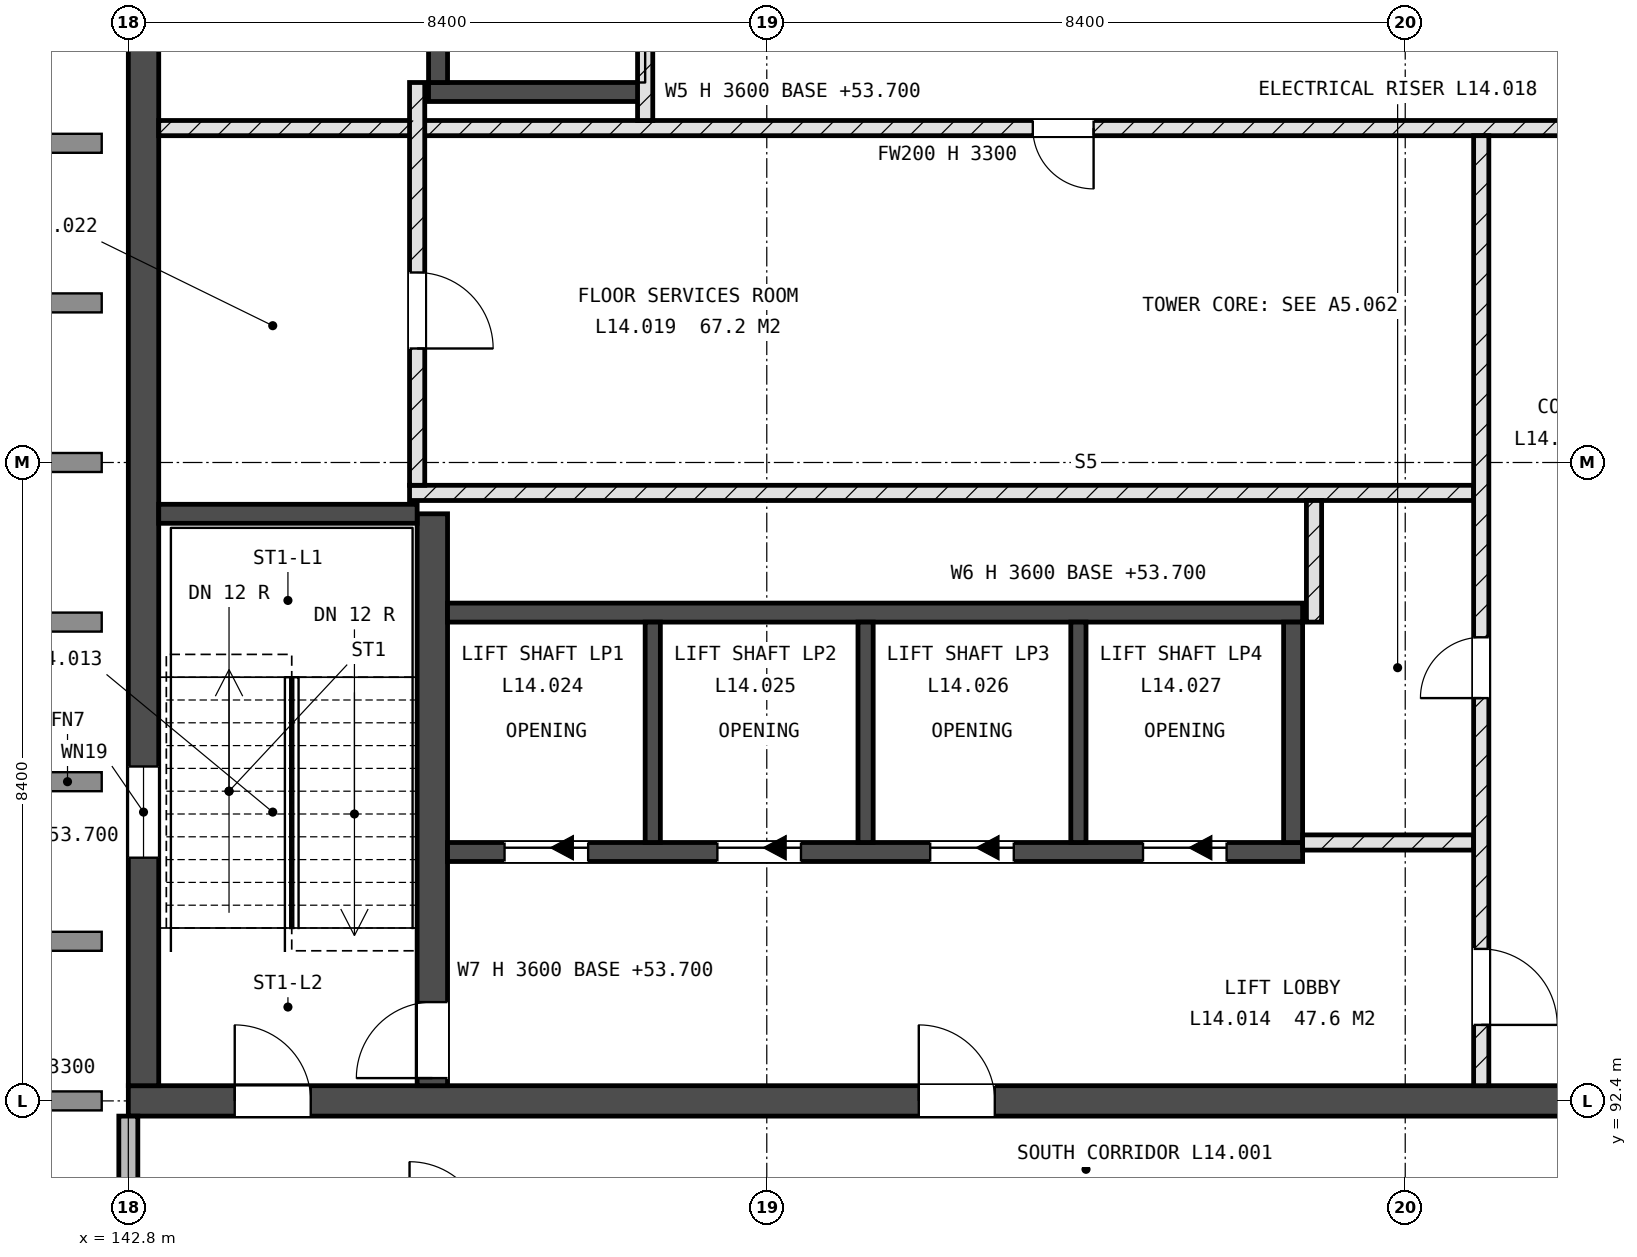
"""IFC4 building model, lengths in metres.
Left out: names, types, materials, properties, quantities, classifications, styles, units other than length and angle.
Written with IfcOpenShell. Run it as: python <this file> out.ifc"""

import sys

from ifc_helpers import new_model, si_unit, direction, frame, frame_2d, origin, place, context, subcontext, project, spatial, rectangle, extrude, element, fill, save


model = new_model("IFC4")
c1 = context("Model", 3, precision=1e-05, world=origin(), true_north=direction((0.0, 1.0)))
c2 = subcontext(c1, "Body", "Model", "MODEL_VIEW")
j1 = project(units=[si_unit("LENGTHUNIT", "METRE"), si_unit("PLANEANGLEUNIT", "RADIAN")], contexts=[c1])
p1 = place(None, origin())
s1 = spatial("IfcSite", under=j1, at=p1, CompositionType="ELEMENT")
p2 = place(p1, origin())
s2 = spatial("IfcBuilding", under=s1, at=p2, CompositionType="ELEMENT")
p3 = place(p2, frame((0.0, 0.0, 54.0)))
s3 = spatial("IfcBuildingStorey", under=s2, at=p3, CompositionType="ELEMENT", Elevation=54.0)
p4 = place(p3, frame((142.8, 92.4, -0.3), z_axis=(0.0, 0.0, 1.0), x_axis=(1.0, 0.0, 0.0)))
e1 = element("IfcWall", 1, at=p4, inside=s3, PredefinedType="SHEAR", context=c2, shape_type="SweptSolid", body=[
    extrude(rectangle(XDim=25.2, YDim=0.4, at=frame_2d((12.6, 0.0))), origin(), (0.0, 0.0, 1.0), 3.6),
])
p5 = place(p4, frame((1.4, 0.0, 0.3)))
e2 = element("IfcOpeningElement", 2, at=p5, cuts=e1, PredefinedType="OPENING", context=c2, shape_type="SweptSolid", body=[
    extrude(rectangle(XDim=1.0, YDim=2.1, at=frame_2d((0.5, 1.05))), frame((0.0, 0.21, 0.0), z_axis=(0.0, -1.0, 0.0), x_axis=(1.0, 0.0, 0.0)), (0.0, 0.0, 1.0), 0.42),
])
p6 = place(p4, frame((19.1, 0.0, 0.3)))
e3 = element("IfcOpeningElement", 3, at=p6, cuts=e1, PredefinedType="OPENING", context=c2, shape_type="SweptSolid", body=[
    extrude(rectangle(XDim=1.0, YDim=2.1, at=frame_2d((0.5, 1.05))), frame((0.0, 0.21, 0.0), z_axis=(0.0, -1.0, 0.0), x_axis=(1.0, 0.0, 0.0)), (0.0, 0.0, 1.0), 0.42),
])
p7 = place(p4, frame((10.4, 0.0, 0.3)))
e4 = element("IfcOpeningElement", 4, at=p7, cuts=e1, PredefinedType="OPENING", context=c2, shape_type="SweptSolid", body=[
    extrude(rectangle(XDim=1.0, YDim=2.1, at=frame_2d((0.5, 1.05))), frame((0.0, 0.21, 0.0), z_axis=(0.0, -1.0, 0.0), x_axis=(1.0, 0.0, 0.0)), (0.0, 0.0, 1.0), 0.42),
])
p8 = place(p3, frame((143.0, 92.6, -0.3), z_axis=(0.0, 0.0, 1.0), x_axis=(0.0, 1.0, 0.0)))
e5 = element("IfcWall", 5, at=p8, inside=s3, PredefinedType="SHEAR", context=c2, shape_type="SweptSolid", body=[
    extrude(rectangle(XDim=16.4, YDim=0.4, at=frame_2d((8.2, 0.0))), origin(), (0.0, 0.0, 1.0), 3.6),
])
p9 = place(p8, frame((3.0, 0.0, 1.9)))
e6 = element("IfcOpeningElement", 6, at=p9, cuts=e5, PredefinedType="OPENING", context=c2, shape_type="SweptSolid", body=[
    extrude(rectangle(XDim=1.2, YDim=0.9, at=frame_2d((0.6, 0.45))), frame((0.0, 0.21, 0.0), z_axis=(0.0, -1.0, 0.0), x_axis=(1.0, 0.0, 0.0)), (0.0, 0.0, 1.0), 0.42),
])
p10 = place(p3, frame((146.8, 92.6, -0.3), z_axis=(0.0, 0.0, 1.0), x_axis=(0.0, 1.0, 0.0)))
e7 = element("IfcWall", 7, at=p10, inside=s3, PredefinedType="SHEAR", context=c2, shape_type="SweptSolid", body=[
    extrude(rectangle(XDim=7.525, YDim=0.4, at=frame_2d((3.762, 0.0))), origin(), (0.0, 0.0, 1.0), 3.6),
])
p11 = place(p10, frame((0.1, 0.0, 0.3)))
e8 = element("IfcOpeningElement", 8, at=p11, cuts=e7, PredefinedType="OPENING", context=c2, shape_type="SweptSolid", body=[
    extrude(rectangle(XDim=1.0, YDim=2.1, at=frame_2d((0.5, 1.05))), frame((0.0, 0.21, 0.0), z_axis=(0.0, -1.0, 0.0), x_axis=(1.0, 0.0, 0.0)), (0.0, 0.0, 1.0), 0.42),
])
p12 = place(p3, frame((143.2, 100.125, -0.3), z_axis=(0.0, 0.0, 1.0), x_axis=(1.0, 0.0, 0.0)))
e9 = element("IfcWall", 9, at=p12, inside=s3, PredefinedType="SHEAR", context=c2, shape_type="SweptSolid", body=[
    extrude(rectangle(XDim=3.4, YDim=0.25, at=frame_2d((1.7, 0.0))), origin(), (0.0, 0.0, 1.0), 3.6),
])
p13 = place(p3, frame((147.0, 95.675, -0.3), z_axis=(0.0, 0.0, 1.0), x_axis=(1.0, 0.0, 0.0)))
e10 = element("IfcWall", 10, at=p13, inside=s3, PredefinedType="SHEAR", context=c2, shape_type="SweptSolid", body=[
    extrude(rectangle(XDim=11.25, YDim=0.25, at=frame_2d((5.625, 0.0))), origin(), (0.0, 0.0, 1.0), 3.6),
])
p14 = place(p13, frame((0.75, 0.0, 0.3)))
e11 = element("IfcOpeningElement", 11, at=p14, cuts=e10, PredefinedType="OPENING", context=c2, shape_type="SweptSolid", body=[
    extrude(rectangle(XDim=1.1, YDim=2.1, at=frame_2d((0.55, 1.05))), frame((0.0, 0.135, 0.0), z_axis=(0.0, -1.0, 0.0), x_axis=(1.0, 0.0, 0.0)), (0.0, 0.0, 1.0), 0.27),
])
p15 = place(p13, frame((3.55, 0.0, 0.3)))
e12 = element("IfcOpeningElement", 12, at=p15, cuts=e10, PredefinedType="OPENING", context=c2, shape_type="SweptSolid", body=[
    extrude(rectangle(XDim=1.1, YDim=2.1, at=frame_2d((0.55, 1.05))), frame((0.0, 0.135, 0.0), z_axis=(0.0, -1.0, 0.0), x_axis=(1.0, 0.0, 0.0)), (0.0, 0.0, 1.0), 0.27),
])
p16 = place(p13, frame((6.35, 0.0, 0.3)))
e13 = element("IfcOpeningElement", 13, at=p16, cuts=e10, PredefinedType="OPENING", context=c2, shape_type="SweptSolid", body=[
    extrude(rectangle(XDim=1.1, YDim=2.1, at=frame_2d((0.55, 1.05))), frame((0.0, 0.135, 0.0), z_axis=(0.0, -1.0, 0.0), x_axis=(1.0, 0.0, 0.0)), (0.0, 0.0, 1.0), 0.27),
])
p17 = place(p13, frame((9.15, 0.0, 0.3)))
e14 = element("IfcOpeningElement", 14, at=p17, cuts=e10, PredefinedType="OPENING", context=c2, shape_type="SweptSolid", body=[
    extrude(rectangle(XDim=1.1, YDim=2.1, at=frame_2d((0.55, 1.05))), frame((0.0, 0.135, 0.0), z_axis=(0.0, -1.0, 0.0), x_axis=(1.0, 0.0, 0.0)), (0.0, 0.0, 1.0), 0.27),
])
p18 = place(p3, frame((147.0, 98.825, -0.3), z_axis=(0.0, 0.0, 1.0), x_axis=(1.0, 0.0, 0.0)))
e15 = element("IfcWall", 15, at=p18, inside=s3, PredefinedType="SHEAR", context=c2, shape_type="SweptSolid", body=[
    extrude(rectangle(XDim=11.25, YDim=0.25, at=frame_2d((5.625, 0.0))), origin(), (0.0, 0.0, 1.0), 3.6),
])
p19 = place(p3, frame((158.125, 95.8, -0.3), z_axis=(0.0, 0.0, 1.0), x_axis=(0.0, 1.0, 0.0)))
e16 = element("IfcWall", 16, at=p19, inside=s3, PredefinedType="SHEAR", context=c2, shape_type="SweptSolid", body=[
    extrude(rectangle(XDim=2.9, YDim=0.25, at=frame_2d((1.45, 0.0))), origin(), (0.0, 0.0, 1.0), 3.6),
])
for number, where, z_axis, x_axis in (
    (17, (149.7, 95.8, -0.3), (0.0, 0.0, 1.0), (0.0, 1.0, 0.0)),
    (18, (152.5, 95.8, -0.3), (0.0, 0.0, 1.0), (0.0, 1.0, 0.0)),
    (19, (155.3, 95.8, -0.3), (0.0, 0.0, 1.0), (0.0, 1.0, 0.0)),
):
    element("IfcWall", number, at=place(p3, frame(where, z_axis=z_axis, x_axis=x_axis)), inside=s3, PredefinedType="SHEAR", context=c2, shape_type="SweptSolid", body=[
        extrude(rectangle(XDim=2.9, YDim=0.2, at=frame_2d((1.45, 0.0))), origin(), (0.0, 0.0, 1.0), 3.6),
    ])
p20 = place(p3, frame((146.75, 105.675, -0.3), z_axis=(0.0, 0.0, 1.0), x_axis=(1.0, 0.0, 0.0)))
e20 = element("IfcWall", 20, at=p20, inside=s3, PredefinedType="SHEAR", context=c2, shape_type="SweptSolid", body=[
    extrude(rectangle(XDim=2.85, YDim=0.25, at=frame_2d((1.425, 0.0))), origin(), (0.0, 0.0, 1.0), 3.6),
])
p21 = place(p3, frame((146.875, 105.8, -0.3), z_axis=(0.0, 0.0, 1.0), x_axis=(0.0, 1.0, 0.0)))
e21 = element("IfcWall", 21, at=p21, inside=s3, PredefinedType="SHEAR", context=c2, shape_type="SweptSolid", body=[
    extrude(rectangle(XDim=2.9, YDim=0.25, at=frame_2d((1.45, 0.0))), origin(), (0.0, 0.0, 1.0), 3.6),
])
p22 = place(p3, frame((142.8, 84.35, 0.0), z_axis=(0.0, 0.0, 1.0), x_axis=(0.0, 1.0, 0.0)))
e22 = element("IfcWall", 22, at=p22, inside=s3, PredefinedType="STANDARD", context=c2, shape_type="SweptSolid", body=[
    extrude(rectangle(XDim=7.85, YDim=0.25, at=frame_2d((3.925, 0.0))), origin(), (0.0, 0.0, 1.0), 3.3),
])
p23 = place(p22, frame((2.35, 0.0, 2.1)))
e23 = element("IfcOpeningElement", 23, at=p23, cuts=e22, PredefinedType="OPENING", context=c2, shape_type="SweptSolid", body=[
    extrude(rectangle(XDim=0.9, YDim=0.6, at=frame_2d((0.45, 0.3))), frame((0.0, 0.135, 0.0), z_axis=(0.0, -1.0, 0.0), x_axis=(1.0, 0.0, 0.0)), (0.0, 0.0, 1.0), 0.27),
])
p24 = place(p3, frame((158.25, 95.8, 0.0), z_axis=(0.0, 0.0, 1.0), x_axis=(1.0, 0.0, 0.0)))
e24 = element("IfcWall", 24, at=p24, inside=s3, PredefinedType="SOLIDWALL", context=c2, shape_type="SweptSolid", body=[
    extrude(rectangle(XDim=2.25, YDim=0.2, at=frame_2d((1.125, 0.0))), origin(), (0.0, 0.0, 1.0), 3.3),
])
p25 = place(p3, frame((146.5, 100.4, 0.0), z_axis=(0.0, 0.0, 1.0), x_axis=(1.0, 0.0, 0.0)))
e25 = element("IfcWall", 25, at=p25, inside=s3, PredefinedType="SOLIDWALL", context=c2, shape_type="SweptSolid", body=[
    extrude(rectangle(XDim=14.0, YDim=0.2, at=frame_2d((7.0, 0.0))), origin(), (0.0, 0.0, 1.0), 3.3),
])
p26 = place(p3, frame((143.2, 105.2, 0.0), z_axis=(0.0, 0.0, 1.0), x_axis=(1.0, 0.0, 0.0)))
e26 = element("IfcWall", 26, at=p26, inside=s3, PredefinedType="SOLIDWALL", context=c2, shape_type="SweptSolid", body=[
    extrude(rectangle(XDim=20.75, YDim=0.2, at=frame_2d((10.375, 0.0))), origin(), (0.0, 0.0, 1.0), 3.3),
])
p27 = place(p26, frame((11.5, 0.0, 0.0)))
e27 = element("IfcOpeningElement", 27, at=p27, cuts=e26, PredefinedType="OPENING", context=c2, shape_type="SweptSolid", body=[
    extrude(rectangle(XDim=0.8, YDim=2.1, at=frame_2d((0.4, 1.05))), frame((0.0, 0.11, 0.0), z_axis=(0.0, -1.0, 0.0), x_axis=(1.0, 0.0, 0.0)), (0.0, 0.0, 1.0), 0.22),
])
p28 = place(p26, frame((18.8, 0.0, 0.0)))
e28 = element("IfcOpeningElement", 28, at=p28, cuts=e26, PredefinedType="OPENING", context=c2, shape_type="SweptSolid", body=[
    extrude(rectangle(XDim=1.0, YDim=2.1, at=frame_2d((0.5, 1.05))), frame((0.0, 0.11, 0.0), z_axis=(0.0, -1.0, 0.0), x_axis=(1.0, 0.0, 0.0)), (0.0, 0.0, 1.0), 0.22),
])
p29 = place(p3, frame((146.6, 100.5, 0.0), z_axis=(0.0, 0.0, 1.0), x_axis=(0.0, 1.0, 0.0)))
e29 = element("IfcWall", 29, at=p29, inside=s3, PredefinedType="SOLIDWALL", context=c2, shape_type="SweptSolid", body=[
    extrude(rectangle(XDim=5.3, YDim=0.2, at=frame_2d((2.65, 0.0))), origin(), (0.0, 0.0, 1.0), 3.3),
])
p30 = place(p29, frame((1.8, 0.0, 0.0)))
e30 = element("IfcOpeningElement", 30, at=p30, cuts=e29, PredefinedType="OPENING", context=c2, shape_type="SweptSolid", body=[
    extrude(rectangle(XDim=1.0, YDim=2.1, at=frame_2d((0.5, 1.05))), frame((0.0, 0.11, 0.0), z_axis=(0.0, -1.0, 0.0), x_axis=(1.0, 0.0, 0.0)), (0.0, 0.0, 1.0), 0.22),
])
p31 = place(p3, frame((149.6, 105.3, 0.0), z_axis=(0.0, 0.0, 1.0), x_axis=(0.0, 1.0, 0.0)))
e31 = element("IfcWall", 31, at=p31, inside=s3, PredefinedType="SOLIDWALL", context=c2, shape_type="SweptSolid", body=[
    extrude(rectangle(XDim=3.7, YDim=0.2, at=frame_2d((1.85, 0.0))), origin(), (0.0, 0.0, 1.0), 3.3),
])
p32 = place(p31, frame((1.4, 0.0, 0.0)))
e32 = element("IfcOpeningElement", 32, at=p32, cuts=e31, PredefinedType="OPENING", context=c2, shape_type="SweptSolid", body=[
    extrude(rectangle(XDim=1.1, YDim=2.1, at=frame_2d((0.55, 1.05))), frame((0.0, 0.11, 0.0), z_axis=(0.0, -1.0, 0.0), x_axis=(1.0, 0.0, 0.0)), (0.0, 0.0, 1.0), 0.22),
])
p33 = place(p3, frame((158.4, 98.7, 0.0), z_axis=(0.0, 0.0, 1.0), x_axis=(0.0, 1.0, 0.0)))
e33 = element("IfcWall", 33, at=p33, inside=s3, PredefinedType="SOLIDWALL", context=c2, shape_type="SweptSolid", body=[
    extrude(rectangle(XDim=1.6, YDim=0.2, at=frame_2d((0.8, 0.0))), origin(), (0.0, 0.0, 1.0), 3.3),
])
p34 = place(p3, frame((160.6, 92.6, 0.0), z_axis=(0.0, 0.0, 1.0), x_axis=(0.0, 1.0, 0.0)))
e34 = element("IfcWall", 34, at=p34, inside=s3, PredefinedType="SOLIDWALL", context=c2, shape_type="SweptSolid", body=[
    extrude(rectangle(XDim=12.5, YDim=0.2, at=frame_2d((6.25, 0.0))), origin(), (0.0, 0.0, 1.0), 3.3),
])
p35 = place(p34, frame((5.1, 0.0, 0.0)))
e35 = element("IfcOpeningElement", 35, at=p35, cuts=e34, PredefinedType="OPENING", context=c2, shape_type="SweptSolid", body=[
    extrude(rectangle(XDim=0.8, YDim=2.1, at=frame_2d((0.4, 1.05))), frame((0.0, 0.11, 0.0), z_axis=(0.0, -1.0, 0.0), x_axis=(1.0, 0.0, 0.0)), (0.0, 0.0, 1.0), 0.22),
])
p36 = place(p34, frame((0.8, 0.0, 0.0)))
e36 = element("IfcOpeningElement", 36, at=p36, cuts=e34, PredefinedType="OPENING", context=c2, shape_type="SweptSolid", body=[
    extrude(rectangle(XDim=1.0, YDim=2.1, at=frame_2d((0.5, 1.05))), frame((0.0, 0.11, 0.0), z_axis=(0.0, -1.0, 0.0), x_axis=(1.0, 0.0, 0.0)), (0.0, 0.0, 1.0), 0.22),
])
p37 = place(p9, origin())
e37 = element("IfcWindow", 37, at=p37, inside=s3, PartitioningType="SINGLE_PANEL", PredefinedType="WINDOW", context=c2, shape_type="SweptSolid", body=[
    extrude(rectangle(XDim=1.2, YDim=0.9, at=frame_2d((0.6, 0.45))), frame((0.0, 0.03, 0.0), z_axis=(0.0, -1.0, 0.0), x_axis=(1.0, 0.0, 0.0)), (0.0, 0.0, 1.0), 0.06),
])
fill(e6, e37)
p38 = place(p14, origin())
e38 = element("IfcDoor", 38, at=p38, inside=s3, OperationType="SLIDING_TO_LEFT", PredefinedType="DOOR", context=c2, shape_type="SweptSolid", body=[
    extrude(rectangle(XDim=1.1, YDim=2.1, at=frame_2d((0.55, 1.05))), frame((0.0, 0.025, 0.0), z_axis=(0.0, -1.0, 0.0), x_axis=(1.0, 0.0, 0.0)), (0.0, 0.0, 1.0), 0.05),
])
fill(e11, e38)
p39 = place(p15, origin())
e39 = element("IfcDoor", 39, at=p39, inside=s3, OperationType="SLIDING_TO_LEFT", PredefinedType="DOOR", context=c2, shape_type="SweptSolid", body=[
    extrude(rectangle(XDim=1.1, YDim=2.1, at=frame_2d((0.55, 1.05))), frame((0.0, 0.025, 0.0), z_axis=(0.0, -1.0, 0.0), x_axis=(1.0, 0.0, 0.0)), (0.0, 0.0, 1.0), 0.05),
])
fill(e12, e39)
p40 = place(p16, origin())
e40 = element("IfcDoor", 40, at=p40, inside=s3, OperationType="SLIDING_TO_LEFT", PredefinedType="DOOR", context=c2, shape_type="SweptSolid", body=[
    extrude(rectangle(XDim=1.1, YDim=2.1, at=frame_2d((0.55, 1.05))), frame((0.0, 0.025, 0.0), z_axis=(0.0, -1.0, 0.0), x_axis=(1.0, 0.0, 0.0)), (0.0, 0.0, 1.0), 0.05),
])
fill(e13, e40)
p41 = place(p17, origin())
e41 = element("IfcDoor", 41, at=p41, inside=s3, OperationType="SLIDING_TO_LEFT", PredefinedType="DOOR", context=c2, shape_type="SweptSolid", body=[
    extrude(rectangle(XDim=1.1, YDim=2.1, at=frame_2d((0.55, 1.05))), frame((0.0, 0.025, 0.0), z_axis=(0.0, -1.0, 0.0), x_axis=(1.0, 0.0, 0.0)), (0.0, 0.0, 1.0), 0.05),
])
fill(e14, e41)
p42 = place(p5, origin())
e42 = element("IfcDoor", 42, at=p42, inside=s3, OperationType="SINGLE_SWING_RIGHT", PredefinedType="DOOR", context=c2, shape_type="SweptSolid", body=[
    extrude(rectangle(XDim=1.0, YDim=2.1, at=frame_2d((0.5, 1.05))), frame((0.0, 0.025, 0.0), z_axis=(0.0, -1.0, 0.0), x_axis=(1.0, 0.0, 0.0)), (0.0, 0.0, 1.0), 0.05),
])
fill(e2, e42)
p43 = place(p11, origin())
e43 = element("IfcDoor", 43, at=p43, inside=s3, OperationType="SINGLE_SWING_RIGHT", PredefinedType="DOOR", context=c2, shape_type="SweptSolid", body=[
    extrude(rectangle(XDim=1.0, YDim=2.1, at=frame_2d((0.5, 1.05))), frame((0.0, 0.025, 0.0), z_axis=(0.0, -1.0, 0.0), x_axis=(1.0, 0.0, 0.0)), (0.0, 0.0, 1.0), 0.05),
])
fill(e8, e43)
p44 = place(p35, origin())
e44 = element("IfcDoor", 44, at=p44, inside=s3, OperationType="SINGLE_SWING_RIGHT", PredefinedType="DOOR", context=c2, shape_type="SweptSolid", body=[
    extrude(rectangle(XDim=0.8, YDim=2.1, at=frame_2d((0.4, 1.05))), frame((0.0, 0.025, 0.0), z_axis=(0.0, -1.0, 0.0), x_axis=(1.0, 0.0, 0.0)), (0.0, 0.0, 1.0), 0.05),
])
fill(e35, e44)
p45 = place(p27, origin())
e45 = element("IfcDoor", 45, at=p45, inside=s3, OperationType="SINGLE_SWING_RIGHT", PredefinedType="DOOR", context=c2, shape_type="SweptSolid", body=[
    extrude(rectangle(XDim=0.8, YDim=2.1, at=frame_2d((0.4, 1.05))), frame((0.0, 0.025, 0.0), z_axis=(0.0, -1.0, 0.0), x_axis=(1.0, 0.0, 0.0)), (0.0, 0.0, 1.0), 0.05),
])
fill(e27, e45)
p46 = place(p30, origin())
e46 = element("IfcDoor", 46, at=p46, inside=s3, OperationType="SINGLE_SWING_LEFT", PredefinedType="DOOR", context=c2, shape_type="SweptSolid", body=[
    extrude(rectangle(XDim=1.0, YDim=2.1, at=frame_2d((0.5, 1.05))), frame((0.0, 0.025, 0.0), z_axis=(0.0, -1.0, 0.0), x_axis=(1.0, 0.0, 0.0)), (0.0, 0.0, 1.0), 0.05),
])
fill(e30, e46)
p47 = place(p7, origin())
e47 = element("IfcDoor", 47, at=p47, inside=s3, OperationType="SINGLE_SWING_RIGHT", PredefinedType="DOOR", context=c2, shape_type="SweptSolid", body=[
    extrude(rectangle(XDim=1.0, YDim=2.1, at=frame_2d((0.5, 1.05))), frame((0.0, 0.025, 0.0), z_axis=(0.0, -1.0, 0.0), x_axis=(1.0, 0.0, 0.0)), (0.0, 0.0, 1.0), 0.05),
])
fill(e4, e47)
p48 = place(p36, origin())
e48 = element("IfcDoor", 48, at=p48, inside=s3, OperationType="SINGLE_SWING_LEFT", PredefinedType="DOOR", context=c2, shape_type="SweptSolid", body=[
    extrude(rectangle(XDim=1.0, YDim=2.1, at=frame_2d((0.5, 1.05))), frame((0.0, 0.025, 0.0), z_axis=(0.0, -1.0, 0.0), x_axis=(1.0, 0.0, 0.0)), (0.0, 0.0, 1.0), 0.05),
])
fill(e36, e48)
save(model, sys.argv[1])
